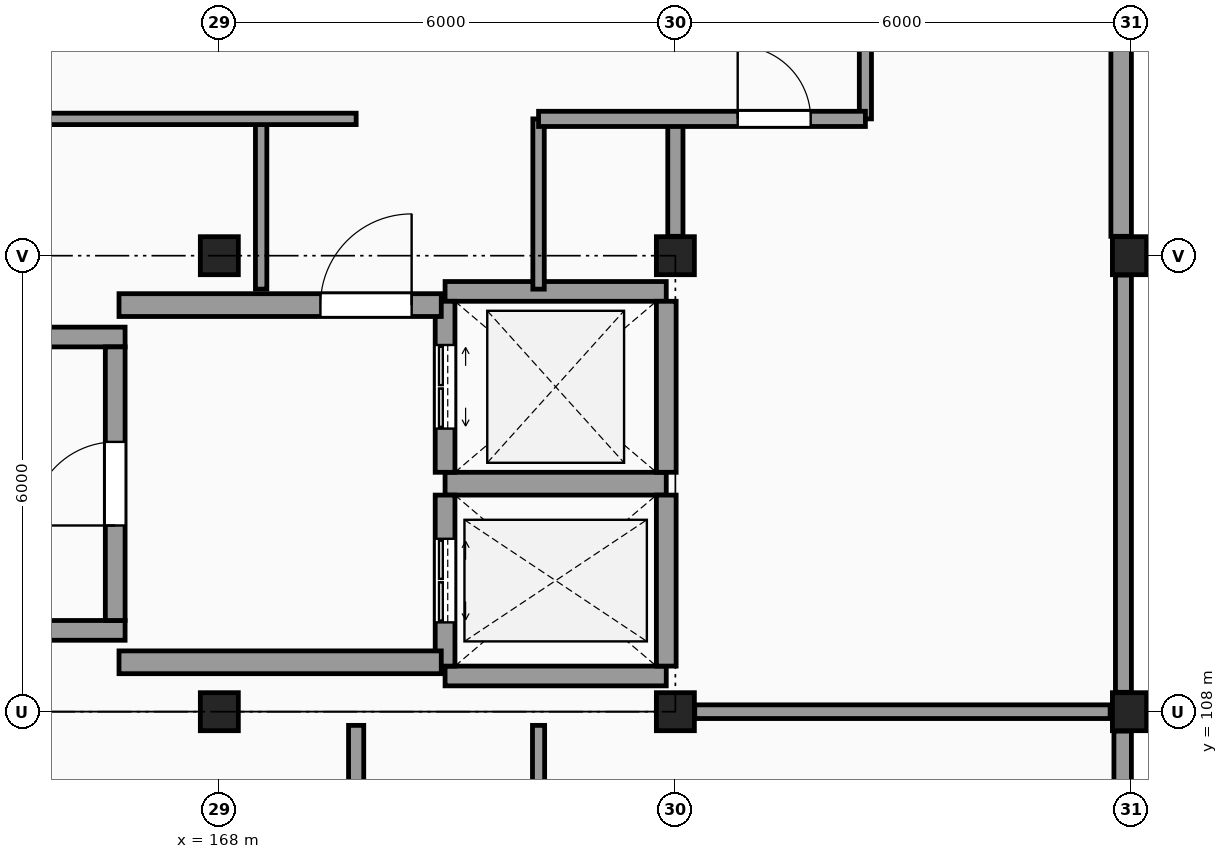
"""IFC4 building model, lengths in metres.
Left out: names, types, materials, properties, quantities, classifications, styles, units other than length and angle.
Written with IfcOpenShell. Run it as: python <this file> out.ifc"""

import sys

from ifc_helpers import new_model, si_unit, direction, frame, frame_2d, origin, origin_2d, place, context, subcontext, project, spatial, rectangle, extrude, element, fill, save


model = new_model("IFC4")
c1 = context("Model", 3, precision=1e-05, world=origin(), true_north=direction((0.0, 1.0)))
c2 = subcontext(c1, "Body", "Model", "MODEL_VIEW")
j1 = project(units=[si_unit("LENGTHUNIT", "METRE"), si_unit("PLANEANGLEUNIT", "RADIAN")], contexts=[c1])
p1 = place(None, origin())
s1 = spatial("IfcSite", under=j1, at=p1, CompositionType="ELEMENT")
p2 = place(p1, origin())
s2 = spatial("IfcBuilding", under=s1, at=p2, CompositionType="ELEMENT")
p3 = place(p2, frame((0.0, 0.0, 41.4)))
s3 = spatial("IfcBuildingStorey", under=s2, at=p3, CompositionType="ELEMENT", Elevation=41.4)
for number, where, z_axis, x_axis in (
    (1, (168.0, 108.0, 0.0), (0.0, 0.0, 1.0), (1.0, 0.0, 0.0)),
    (2, (168.0, 114.0, 0.0), (0.0, 0.0, 1.0), (1.0, 0.0, 0.0)),
    (3, (174.0, 108.0, 0.0), (0.0, 0.0, 1.0), (1.0, 0.0, 0.0)),
    (4, (174.0, 114.0, 0.0), (0.0, 0.0, 1.0), (1.0, 0.0, 0.0)),
    (5, (180.0, 108.0, 0.0), (0.0, 0.0, 1.0), (1.0, 0.0, 0.0)),
    (6, (180.0, 114.0, 0.0), (0.0, 0.0, 1.0), (1.0, 0.0, 0.0)),
):
    element("IfcColumn", number, at=place(p3, frame(where, z_axis=z_axis, x_axis=x_axis)), inside=s3, PredefinedType="COLUMN", context=c2, shape_type="SweptSolid", body=[
        extrude(rectangle(XDim=0.5, YDim=0.5, at=origin_2d()), origin(), (0.0, 0.0, 1.0), 3.3),
    ])
p4 = place(p3, frame((179.885, 102.255, 0.0), z_axis=(0.0, 0.0, 1.0), x_axis=(0.0, 1.0, 0.0)))
e7 = element("IfcWall", 7, at=p4, inside=s3, PredefinedType="SOLIDWALL", context=c2, shape_type="SweptSolid", body=[
    extrude(rectangle(XDim=5.49, YDim=0.23, at=frame_2d((2.745, 0.0))), origin(), (0.0, 0.0, 1.0), 2.41),
])
p5 = place(p4, frame((2.045, 0.0, 0.8)))
e8 = element("IfcOpeningElement", 8, at=p5, cuts=e7, PredefinedType="OPENING", context=c2, shape_type="SweptSolid", body=[
    extrude(rectangle(XDim=1.4, YDim=1.4, at=frame_2d((0.7, 0.7))), frame((0.0, 0.125, 0.0), z_axis=(0.0, -1.0, 0.0), x_axis=(1.0, 0.0, 0.0)), (0.0, 0.0, 1.0), 0.25),
])
p6 = place(p3, frame((179.895, 108.255, 0.0), z_axis=(0.0, 0.0, 1.0), x_axis=(0.0, 1.0, 0.0)))
e9 = element("IfcWall", 9, at=p6, inside=s3, PredefinedType="SOLIDWALL", context=c2, shape_type="SweptSolid", body=[
    extrude(rectangle(XDim=5.49, YDim=0.21, at=frame_2d((2.745, 0.0))), origin(), (0.0, 0.0, 1.0), 2.41),
])
p7 = place(p3, frame((179.865, 114.255, 0.0), z_axis=(0.0, 0.0, 1.0), x_axis=(0.0, 1.0, 0.0)))
e10 = element("IfcWall", 10, at=p7, inside=s3, PredefinedType="SOLIDWALL", context=c2, shape_type="SweptSolid", body=[
    extrude(rectangle(XDim=5.49, YDim=0.27, at=frame_2d((2.745, 0.0))), origin(), (0.0, 0.0, 1.0), 2.41),
])
for number, where, z_axis, x_axis in (
    (11, (156.04, 109.07, 0.0), (0.0, 0.0, 1.0), (1.0, 0.0, 0.0)),
    (12, (156.04, 112.93, 0.0), (0.0, 0.0, 1.0), (1.0, 0.0, 0.0)),
):
    element("IfcWall", number, at=place(p3, frame(where, z_axis=z_axis, x_axis=x_axis)), inside=s3, PredefinedType="SHEAR", context=c2, shape_type="SweptSolid", body=[
        extrude(rectangle(XDim=10.72, YDim=0.26, at=frame_2d((5.36, 0.0))), origin(), (0.0, 0.0, 1.0), 3.3),
    ])
p8 = place(p3, frame((166.63, 109.2, 0.0), z_axis=(0.0, 0.0, 1.0), x_axis=(0.0, 1.0, 0.0)))
e13 = element("IfcWall", 13, at=p8, inside=s3, PredefinedType="SHEAR", context=c2, shape_type="SweptSolid", body=[
    extrude(rectangle(XDim=3.6, YDim=0.26, at=frame_2d((1.8, 0.0))), origin(), (0.0, 0.0, 1.0), 3.3),
])
p9 = place(p8, frame((1.25, 0.0, 0.0)))
e14 = element("IfcOpeningElement", 14, at=p9, cuts=e13, PredefinedType="OPENING", context=c2, shape_type="SweptSolid", body=[
    extrude(rectangle(XDim=1.1, YDim=2.15, at=frame_2d((0.55, 1.075))), frame((0.0, 0.14, 0.0), z_axis=(0.0, -1.0, 0.0), x_axis=(1.0, 0.0, 0.0)), (0.0, 0.0, 1.0), 0.28),
])
p10 = place(p3, frame((170.97, 108.47, 0.0), z_axis=(0.0, 0.0, 1.0), x_axis=(1.0, 0.0, 0.0)))
e15 = element("IfcWall", 15, at=p10, inside=s3, PredefinedType="SHEAR", context=c2, shape_type="SweptSolid", body=[
    extrude(rectangle(XDim=2.91, YDim=0.26, at=frame_2d((1.455, 0.0))), origin(), (0.0, 0.0, 1.0), 3.3),
])
p11 = place(p3, frame((170.97, 111.0, 0.0), z_axis=(0.0, 0.0, 1.0), x_axis=(1.0, 0.0, 0.0)))
e16 = element("IfcWall", 16, at=p11, inside=s3, PredefinedType="SHEAR", context=c2, shape_type="SweptSolid", body=[
    extrude(rectangle(XDim=2.91, YDim=0.3, at=frame_2d((1.455, 0.0))), origin(), (0.0, 0.0, 1.0), 3.3),
])
p12 = place(p3, frame((173.88, 108.6, 0.0), z_axis=(0.0, 0.0, 1.0), x_axis=(0.0, 1.0, 0.0)))
e17 = element("IfcWall", 17, at=p12, inside=s3, PredefinedType="SHEAR", context=c2, shape_type="SweptSolid", body=[
    extrude(rectangle(XDim=2.25, YDim=0.26, at=frame_2d((1.125, 0.0))), origin(), (0.0, 0.0, 1.0), 3.3),
])
p13 = place(p3, frame((170.97, 108.6, 0.0), z_axis=(0.0, 0.0, 1.0), x_axis=(0.0, 1.0, 0.0)))
e18 = element("IfcWall", 18, at=p13, inside=s3, PredefinedType="SHEAR", context=c2, shape_type="SweptSolid", body=[
    extrude(rectangle(XDim=2.25, YDim=0.26, at=frame_2d((1.125, 0.0))), origin(), (0.0, 0.0, 1.0), 3.3),
])
p14 = place(p13, frame((0.575, 0.0, 0.0)))
e19 = element("IfcOpeningElement", 19, at=p14, cuts=e18, PredefinedType="OPENING", context=c2, shape_type="SweptSolid", body=[
    extrude(rectangle(XDim=1.1, YDim=2.2, at=frame_2d((0.55, 1.1))), frame((0.0, 0.14, 0.0), z_axis=(0.0, -1.0, 0.0), x_axis=(1.0, 0.0, 0.0)), (0.0, 0.0, 1.0), 0.28),
])
p15 = place(p3, frame((170.97, 113.53, 0.0), z_axis=(0.0, 0.0, 1.0), x_axis=(1.0, 0.0, 0.0)))
e20 = element("IfcWall", 20, at=p15, inside=s3, PredefinedType="SHEAR", context=c2, shape_type="SweptSolid", body=[
    extrude(rectangle(XDim=2.91, YDim=0.26, at=frame_2d((1.455, 0.0))), origin(), (0.0, 0.0, 1.0), 3.3),
])
p16 = place(p3, frame((173.88, 111.15, 0.0), z_axis=(0.0, 0.0, 1.0), x_axis=(0.0, 1.0, 0.0)))
e21 = element("IfcWall", 21, at=p16, inside=s3, PredefinedType="SHEAR", context=c2, shape_type="SweptSolid", body=[
    extrude(rectangle(XDim=2.25, YDim=0.26, at=frame_2d((1.125, 0.0))), origin(), (0.0, 0.0, 1.0), 3.3),
])
p17 = place(p3, frame((170.97, 111.15, 0.0), z_axis=(0.0, 0.0, 1.0), x_axis=(0.0, 1.0, 0.0)))
e22 = element("IfcWall", 22, at=p17, inside=s3, PredefinedType="SHEAR", context=c2, shape_type="SweptSolid", body=[
    extrude(rectangle(XDim=2.25, YDim=0.26, at=frame_2d((1.125, 0.0))), origin(), (0.0, 0.0, 1.0), 3.3),
])
p18 = place(p17, frame((0.575, 0.0, 0.0)))
e23 = element("IfcOpeningElement", 23, at=p18, cuts=e22, PredefinedType="OPENING", context=c2, shape_type="SweptSolid", body=[
    extrude(rectangle(XDim=1.1, YDim=2.2, at=frame_2d((0.55, 1.1))), frame((0.0, 0.14, 0.0), z_axis=(0.0, -1.0, 0.0), x_axis=(1.0, 0.0, 0.0)), (0.0, 0.0, 1.0), 0.28),
])
p19 = place(p3, frame((166.68, 113.35, 0.0), z_axis=(0.0, 0.0, 1.0), x_axis=(1.0, 0.0, 0.0)))
e24 = element("IfcWall", 24, at=p19, inside=s3, PredefinedType="SHEAR", context=c2, shape_type="SweptSolid", body=[
    extrude(rectangle(XDim=4.24, YDim=0.3, at=frame_2d((2.12, 0.0))), origin(), (0.0, 0.0, 1.0), 3.3),
])
p20 = place(p19, frame((2.65, 0.0, 0.0)))
e25 = element("IfcOpeningElement", 25, at=p20, cuts=e24, PredefinedType="OPENING", context=c2, shape_type="SweptSolid", body=[
    extrude(rectangle(XDim=1.2, YDim=2.2, at=frame_2d((0.6, 1.1))), frame((0.0, 0.16, 0.0), z_axis=(0.0, -1.0, 0.0), x_axis=(1.0, 0.0, 0.0)), (0.0, 0.0, 1.0), 0.32),
])
p21 = place(p3, frame((166.68, 108.65, 0.0), z_axis=(0.0, 0.0, 1.0), x_axis=(1.0, 0.0, 0.0)))
e26 = element("IfcWall", 26, at=p21, inside=s3, PredefinedType="SHEAR", context=c2, shape_type="SweptSolid", body=[
    extrude(rectangle(XDim=4.24, YDim=0.3, at=frame_2d((2.12, 0.0))), origin(), (0.0, 0.0, 1.0), 3.3),
])
p22 = place(p3, frame((168.55, 113.56, 0.0), z_axis=(0.0, 0.0, 1.0), x_axis=(0.0, 1.0, 0.0)))
e27 = element("IfcWall", 27, at=p22, inside=s3, PredefinedType="PARTITIONING", context=c2, shape_type="SweptSolid", body=[
    extrude(rectangle(XDim=2.24, YDim=0.15, at=frame_2d((1.12, 0.0))), origin(), (0.0, 0.0, 1.0), 3.06),
])
p23 = place(p3, frame((169.8, 42.275, 0.0), z_axis=(0.0, 0.0, 1.0), x_axis=(0.0, 1.0, 0.0)))
e28 = element("IfcWall", 28, at=p23, inside=s3, PredefinedType="PARTITIONING", context=c2, shape_type="SweptSolid", body=[
    extrude(rectangle(XDim=65.545, YDim=0.2, at=frame_2d((32.772, 0.0))), origin(), (0.0, 0.0, 1.0), 3.06),
])
p24 = place(p23, frame((50.125, 0.0, 0.0)))
e29 = element("IfcOpeningElement", 29, at=p24, cuts=e28, PredefinedType="OPENING", context=c2, shape_type="SweptSolid", body=[
    extrude(rectangle(XDim=1.2, YDim=2.2, at=frame_2d((0.6, 1.1))), frame((0.0, 0.11, 0.0), z_axis=(0.0, -1.0, 0.0), x_axis=(1.0, 0.0, 0.0)), (0.0, 0.0, 1.0), 0.22),
])
p25 = place(p23, frame((31.925, 0.0, 0.0)))
e30 = element("IfcOpeningElement", 30, at=p25, cuts=e28, PredefinedType="OPENING", context=c2, shape_type="SweptSolid", body=[
    extrude(rectangle(XDim=1.6, YDim=2.25, at=frame_2d((0.8, 1.125))), frame((0.0, 0.11, 0.0), z_axis=(0.0, -1.0, 0.0), x_axis=(1.0, 0.0, 0.0)), (0.0, 0.0, 1.0), 0.22),
])
p26 = place(p23, frame((0.4, 0.0, 0.0)))
e31 = element("IfcOpeningElement", 31, at=p26, cuts=e28, PredefinedType="OPENING", context=c2, shape_type="SweptSolid", body=[
    extrude(rectangle(XDim=0.95, YDim=2.1, at=frame_2d((0.475, 1.05))), frame((0.0, 0.11, 0.0), z_axis=(0.0, -1.0, 0.0), x_axis=(1.0, 0.0, 0.0)), (0.0, 0.0, 1.0), 0.22),
])
p27 = place(p23, frame((6.45, 0.0, 0.0)))
e32 = element("IfcOpeningElement", 32, at=p27, cuts=e28, PredefinedType="OPENING", context=c2, shape_type="SweptSolid", body=[
    extrude(rectangle(XDim=0.95, YDim=2.1, at=frame_2d((0.475, 1.05))), frame((0.0, 0.11, 0.0), z_axis=(0.0, -1.0, 0.0), x_axis=(1.0, 0.0, 0.0)), (0.0, 0.0, 1.0), 0.22),
])
p28 = place(p23, frame((12.45, 0.0, 0.0)))
e33 = element("IfcOpeningElement", 33, at=p28, cuts=e28, PredefinedType="OPENING", context=c2, shape_type="SweptSolid", body=[
    extrude(rectangle(XDim=0.95, YDim=2.1, at=frame_2d((0.475, 1.05))), frame((0.0, 0.11, 0.0), z_axis=(0.0, -1.0, 0.0), x_axis=(1.0, 0.0, 0.0)), (0.0, 0.0, 1.0), 0.22),
])
p29 = place(p23, frame((18.45, 0.0, 0.0)))
e34 = element("IfcOpeningElement", 34, at=p29, cuts=e28, PredefinedType="OPENING", context=c2, shape_type="SweptSolid", body=[
    extrude(rectangle(XDim=0.95, YDim=2.1, at=frame_2d((0.475, 1.05))), frame((0.0, 0.11, 0.0), z_axis=(0.0, -1.0, 0.0), x_axis=(1.0, 0.0, 0.0)), (0.0, 0.0, 1.0), 0.22),
])
p30 = place(p23, frame((54.45, 0.0, 0.0)))
e35 = element("IfcOpeningElement", 35, at=p30, cuts=e28, PredefinedType="OPENING", context=c2, shape_type="SweptSolid", body=[
    extrude(rectangle(XDim=0.95, YDim=2.1, at=frame_2d((0.475, 1.05))), frame((0.0, 0.11, 0.0), z_axis=(0.0, -1.0, 0.0), x_axis=(1.0, 0.0, 0.0)), (0.0, 0.0, 1.0), 0.22),
])
p31 = place(p23, frame((60.45, 0.0, 0.0)))
e36 = element("IfcOpeningElement", 36, at=p31, cuts=e28, PredefinedType="OPENING", context=c2, shape_type="SweptSolid", body=[
    extrude(rectangle(XDim=0.95, YDim=2.1, at=frame_2d((0.475, 1.05))), frame((0.0, 0.11, 0.0), z_axis=(0.0, -1.0, 0.0), x_axis=(1.0, 0.0, 0.0)), (0.0, 0.0, 1.0), 0.22),
])
p32 = place(p3, frame((172.2, 42.275, 0.0), z_axis=(0.0, 0.0, 1.0), x_axis=(0.0, 1.0, 0.0)))
e37 = element("IfcWall", 37, at=p32, inside=s3, PredefinedType="PARTITIONING", context=c2, shape_type="SweptSolid", body=[
    extrude(rectangle(XDim=65.545, YDim=0.16, at=frame_2d((32.772, 0.0))), origin(), (0.0, 0.0, 1.0), 3.06),
])
p33 = place(p32, frame((0.4, 0.0, 0.0)))
e38 = element("IfcOpeningElement", 38, at=p33, cuts=e37, PredefinedType="OPENING", context=c2, shape_type="SweptSolid", body=[
    extrude(rectangle(XDim=0.95, YDim=2.1, at=frame_2d((0.475, 1.05))), frame((0.0, 0.09, 0.0), z_axis=(0.0, -1.0, 0.0), x_axis=(1.0, 0.0, 0.0)), (0.0, 0.0, 1.0), 0.18),
])
p34 = place(p32, frame((4.85, 0.0, 0.0)))
e39 = element("IfcOpeningElement", 39, at=p34, cuts=e37, PredefinedType="OPENING", context=c2, shape_type="SweptSolid", body=[
    extrude(rectangle(XDim=0.95, YDim=2.1, at=frame_2d((0.475, 1.05))), frame((0.0, 0.09, 0.0), z_axis=(0.0, -1.0, 0.0), x_axis=(1.0, 0.0, 0.0)), (0.0, 0.0, 1.0), 0.18),
])
p35 = place(p32, frame((9.35, 0.0, 0.0)))
e40 = element("IfcOpeningElement", 40, at=p35, cuts=e37, PredefinedType="OPENING", context=c2, shape_type="SweptSolid", body=[
    extrude(rectangle(XDim=0.95, YDim=2.1, at=frame_2d((0.475, 1.05))), frame((0.0, 0.09, 0.0), z_axis=(0.0, -1.0, 0.0), x_axis=(1.0, 0.0, 0.0)), (0.0, 0.0, 1.0), 0.18),
])
p36 = place(p32, frame((18.45, 0.0, 0.0)))
e41 = element("IfcOpeningElement", 41, at=p36, cuts=e37, PredefinedType="OPENING", context=c2, shape_type="SweptSolid", body=[
    extrude(rectangle(XDim=0.95, YDim=2.1, at=frame_2d((0.475, 1.05))), frame((0.0, 0.09, 0.0), z_axis=(0.0, -1.0, 0.0), x_axis=(1.0, 0.0, 0.0)), (0.0, 0.0, 1.0), 0.18),
])
p37 = place(p32, frame((22.85, 0.0, 0.0)))
e42 = element("IfcOpeningElement", 42, at=p37, cuts=e37, PredefinedType="OPENING", context=c2, shape_type="SweptSolid", body=[
    extrude(rectangle(XDim=0.95, YDim=2.1, at=frame_2d((0.475, 1.05))), frame((0.0, 0.09, 0.0), z_axis=(0.0, -1.0, 0.0), x_axis=(1.0, 0.0, 0.0)), (0.0, 0.0, 1.0), 0.18),
])
p38 = place(p32, frame((30.05, 0.0, 0.0)))
e43 = element("IfcOpeningElement", 43, at=p38, cuts=e37, PredefinedType="OPENING", context=c2, shape_type="SweptSolid", body=[
    extrude(rectangle(XDim=0.95, YDim=2.1, at=frame_2d((0.475, 1.05))), frame((0.0, 0.09, 0.0), z_axis=(0.0, -1.0, 0.0), x_axis=(1.0, 0.0, 0.0)), (0.0, 0.0, 1.0), 0.18),
])
p39 = place(p32, frame((38.3, 0.0, 0.0)))
e44 = element("IfcOpeningElement", 44, at=p39, cuts=e37, PredefinedType="OPENING", context=c2, shape_type="SweptSolid", body=[
    extrude(rectangle(XDim=0.95, YDim=2.1, at=frame_2d((0.475, 1.05))), frame((0.0, 0.09, 0.0), z_axis=(0.0, -1.0, 0.0), x_axis=(1.0, 0.0, 0.0)), (0.0, 0.0, 1.0), 0.18),
])
p40 = place(p32, frame((40.85, 0.0, 0.0)))
e45 = element("IfcOpeningElement", 45, at=p40, cuts=e37, PredefinedType="OPENING", context=c2, shape_type="SweptSolid", body=[
    extrude(rectangle(XDim=0.95, YDim=2.1, at=frame_2d((0.475, 1.05))), frame((0.0, 0.09, 0.0), z_axis=(0.0, -1.0, 0.0), x_axis=(1.0, 0.0, 0.0)), (0.0, 0.0, 1.0), 0.18),
])
p41 = place(p32, frame((48.05, 0.0, 0.0)))
e46 = element("IfcOpeningElement", 46, at=p41, cuts=e37, PredefinedType="OPENING", context=c2, shape_type="SweptSolid", body=[
    extrude(rectangle(XDim=0.95, YDim=2.1, at=frame_2d((0.475, 1.05))), frame((0.0, 0.09, 0.0), z_axis=(0.0, -1.0, 0.0), x_axis=(1.0, 0.0, 0.0)), (0.0, 0.0, 1.0), 0.18),
])
p42 = place(p32, frame((52.25, 0.0, 0.0)))
e47 = element("IfcOpeningElement", 47, at=p42, cuts=e37, PredefinedType="OPENING", context=c2, shape_type="SweptSolid", body=[
    extrude(rectangle(XDim=0.95, YDim=2.1, at=frame_2d((0.475, 1.05))), frame((0.0, 0.09, 0.0), z_axis=(0.0, -1.0, 0.0), x_axis=(1.0, 0.0, 0.0)), (0.0, 0.0, 1.0), 0.18),
])
p43 = place(p32, frame((54.45, 0.0, 0.0)))
e48 = element("IfcOpeningElement", 48, at=p43, cuts=e37, PredefinedType="OPENING", context=c2, shape_type="SweptSolid", body=[
    extrude(rectangle(XDim=0.95, YDim=2.1, at=frame_2d((0.475, 1.05))), frame((0.0, 0.09, 0.0), z_axis=(0.0, -1.0, 0.0), x_axis=(1.0, 0.0, 0.0)), (0.0, 0.0, 1.0), 0.18),
])
p44 = place(p32, frame((60.45, 0.0, 0.0)))
e49 = element("IfcOpeningElement", 49, at=p44, cuts=e37, PredefinedType="OPENING", context=c2, shape_type="SweptSolid", body=[
    extrude(rectangle(XDim=0.95, YDim=2.1, at=frame_2d((0.475, 1.05))), frame((0.0, 0.09, 0.0), z_axis=(0.0, -1.0, 0.0), x_axis=(1.0, 0.0, 0.0)), (0.0, 0.0, 1.0), 0.18),
])
p45 = place(p3, frame((172.2, 113.56, 0.0), z_axis=(0.0, 0.0, 1.0), x_axis=(0.0, 1.0, 0.0)))
e50 = element("IfcWall", 50, at=p45, inside=s3, PredefinedType="PARTITIONING", context=c2, shape_type="SweptSolid", body=[
    extrude(rectangle(XDim=2.24, YDim=0.15, at=frame_2d((1.12, 0.0))), origin(), (0.0, 0.0, 1.0), 3.06),
])
p46 = place(p3, frame((174.0, 114.255, 0.0), z_axis=(0.0, 0.0, 1.0), x_axis=(0.0, 1.0, 0.0)))
e51 = element("IfcWall", 51, at=p46, inside=s3, PredefinedType="PARTITIONING", context=c2, shape_type="SweptSolid", body=[
    extrude(rectangle(XDim=1.545, YDim=0.2, at=frame_2d((0.772, 0.0))), origin(), (0.0, 0.0, 1.0), 2.26),
])
p47 = place(p3, frame((176.5, 115.8, 0.0), z_axis=(0.0, 0.0, 1.0), x_axis=(0.0, 1.0, 0.0)))
e52 = element("IfcWall", 52, at=p47, inside=s3, PredefinedType="PARTITIONING", context=c2, shape_type="SweptSolid", body=[
    extrude(rectangle(XDim=2.4, YDim=0.16, at=frame_2d((1.2, 0.0))), origin(), (0.0, 0.0, 1.0), 3.06),
])
p48 = place(p3, frame((174.255, 108.0, 0.0), z_axis=(0.0, 0.0, 1.0), x_axis=(1.0, 0.0, 0.0)))
e53 = element("IfcWall", 53, at=p48, inside=s3, PredefinedType="PARTITIONING", context=c2, shape_type="SweptSolid", body=[
    extrude(rectangle(XDim=5.465, YDim=0.18, at=frame_2d((2.732, 0.0))), origin(), (0.0, 0.0, 1.0), 2.26),
])
p49 = place(p3, frame((102.275, 115.8, 0.0), z_axis=(0.0, 0.0, 1.0), x_axis=(1.0, 0.0, 0.0)))
e54 = element("IfcWall", 54, at=p49, inside=s3, PredefinedType="PARTITIONING", context=c2, shape_type="SweptSolid", body=[
    extrude(rectangle(XDim=67.525, YDim=0.15, at=frame_2d((33.763, 0.0))), origin(), (0.0, 0.0, 1.0), 3.06),
])
p50 = place(p49, frame((44.125, 0.0, 0.0)))
e55 = element("IfcOpeningElement", 55, at=p50, cuts=e54, PredefinedType="OPENING", context=c2, shape_type="SweptSolid", body=[
    extrude(rectangle(XDim=1.2, YDim=2.2, at=frame_2d((0.6, 1.1))), frame((0.0, 0.085, 0.0), z_axis=(0.0, -1.0, 0.0), x_axis=(1.0, 0.0, 0.0)), (0.0, 0.0, 1.0), 0.17),
])
p51 = place(p49, frame((14.125, 0.0, 0.0)))
e56 = element("IfcOpeningElement", 56, at=p51, cuts=e54, PredefinedType="OPENING", context=c2, shape_type="SweptSolid", body=[
    extrude(rectangle(XDim=1.2, YDim=2.2, at=frame_2d((0.6, 1.1))), frame((0.0, 0.085, 0.0), z_axis=(0.0, -1.0, 0.0), x_axis=(1.0, 0.0, 0.0)), (0.0, 0.0, 1.0), 0.17),
])
p52 = place(p49, frame((19.275, 0.0, 0.0)))
e57 = element("IfcOpeningElement", 57, at=p52, cuts=e54, PredefinedType="OPENING", context=c2, shape_type="SweptSolid", body=[
    extrude(rectangle(XDim=1.0, YDim=2.15, at=frame_2d((0.5, 1.075))), frame((0.0, 0.085, 0.0), z_axis=(0.0, -1.0, 0.0), x_axis=(1.0, 0.0, 0.0)), (0.0, 0.0, 1.0), 0.17),
])
p53 = place(p49, frame((26.245, 0.0, 0.0)))
e58 = element("IfcOpeningElement", 58, at=p53, cuts=e54, PredefinedType="OPENING", context=c2, shape_type="SweptSolid", body=[
    extrude(rectangle(XDim=0.96, YDim=2.15, at=frame_2d((0.48, 1.075))), frame((0.0, 0.085, 0.0), z_axis=(0.0, -1.0, 0.0), x_axis=(1.0, 0.0, 0.0)), (0.0, 0.0, 1.0), 0.17),
])
p54 = place(p49, frame((48.45, 0.0, 0.0)))
e59 = element("IfcOpeningElement", 59, at=p54, cuts=e54, PredefinedType="OPENING", context=c2, shape_type="SweptSolid", body=[
    extrude(rectangle(XDim=0.95, YDim=2.1, at=frame_2d((0.475, 1.05))), frame((0.0, 0.085, 0.0), z_axis=(0.0, -1.0, 0.0), x_axis=(1.0, 0.0, 0.0)), (0.0, 0.0, 1.0), 0.17),
])
p55 = place(p3, frame((172.2, 115.8, 0.0), z_axis=(0.0, 0.0, 1.0), x_axis=(1.0, 0.0, 0.0)))
e60 = element("IfcWall", 60, at=p55, inside=s3, PredefinedType="PARTITIONING", context=c2, shape_type="SweptSolid", body=[
    extrude(rectangle(XDim=4.3, YDim=0.2, at=frame_2d((2.15, 0.0))), origin(), (0.0, 0.0, 1.0), 3.06),
])
p56 = place(p55, frame((2.62, 0.0, 0.0)))
e61 = element("IfcOpeningElement", 61, at=p56, cuts=e60, PredefinedType="OPENING", context=c2, shape_type="SweptSolid", body=[
    extrude(rectangle(XDim=0.96, YDim=2.15, at=frame_2d((0.48, 1.075))), frame((0.0, 0.11, 0.0), z_axis=(0.0, -1.0, 0.0), x_axis=(1.0, 0.0, 0.0)), (0.0, 0.0, 1.0), 0.22),
])
p57 = place(p9, origin())
e62 = element("IfcDoor", 62, at=p57, inside=s3, OperationType="SINGLE_SWING_LEFT", PredefinedType="DOOR", context=c2, shape_type="SweptSolid", body=[
    extrude(rectangle(XDim=1.1, YDim=2.15, at=frame_2d((0.55, 1.075))), frame((0.0, 0.025, 0.0), z_axis=(0.0, -1.0, 0.0), x_axis=(1.0, 0.0, 0.0)), (0.0, 0.0, 1.0), 0.05),
])
fill(e14, e62)
p58 = place(p14, origin())
e63 = element("IfcDoor", 63, at=p58, inside=s3, OperationType="DOUBLE_DOOR_SLIDING", PredefinedType="DOOR", context=c2, shape_type="SweptSolid", body=[
    extrude(rectangle(XDim=1.1, YDim=2.2, at=frame_2d((0.55, 1.1))), frame((0.0, 0.025, 0.0), z_axis=(0.0, -1.0, 0.0), x_axis=(1.0, 0.0, 0.0)), (0.0, 0.0, 1.0), 0.05),
])
fill(e19, e63)
p59 = place(p18, origin())
e64 = element("IfcDoor", 64, at=p59, inside=s3, OperationType="DOUBLE_DOOR_SLIDING", PredefinedType="DOOR", context=c2, shape_type="SweptSolid", body=[
    extrude(rectangle(XDim=1.1, YDim=2.2, at=frame_2d((0.55, 1.1))), frame((0.0, 0.025, 0.0), z_axis=(0.0, -1.0, 0.0), x_axis=(1.0, 0.0, 0.0)), (0.0, 0.0, 1.0), 0.05),
])
fill(e23, e64)
p60 = place(p20, origin())
e65 = element("IfcDoor", 65, at=p60, inside=s3, OperationType="SINGLE_SWING_RIGHT", PredefinedType="DOOR", context=c2, shape_type="SweptSolid", body=[
    extrude(rectangle(XDim=1.2, YDim=2.2, at=frame_2d((0.6, 1.1))), frame((0.0, 0.025, 0.0), z_axis=(0.0, -1.0, 0.0), x_axis=(1.0, 0.0, 0.0)), (0.0, 0.0, 1.0), 0.05),
])
fill(e25, e65)
p61 = place(p56, origin())
e66 = element("IfcDoor", 66, at=p61, inside=s3, OperationType="SINGLE_SWING_LEFT", PredefinedType="DOOR", context=c2, shape_type="SweptSolid", body=[
    extrude(rectangle(XDim=0.96, YDim=2.15, at=frame_2d((0.48, 1.075))), frame((0.0, 0.025, 0.0), z_axis=(0.0, -1.0, 0.0), x_axis=(1.0, 0.0, 0.0)), (0.0, 0.0, 1.0), 0.05),
])
fill(e61, e66)
save(model, sys.argv[1])
